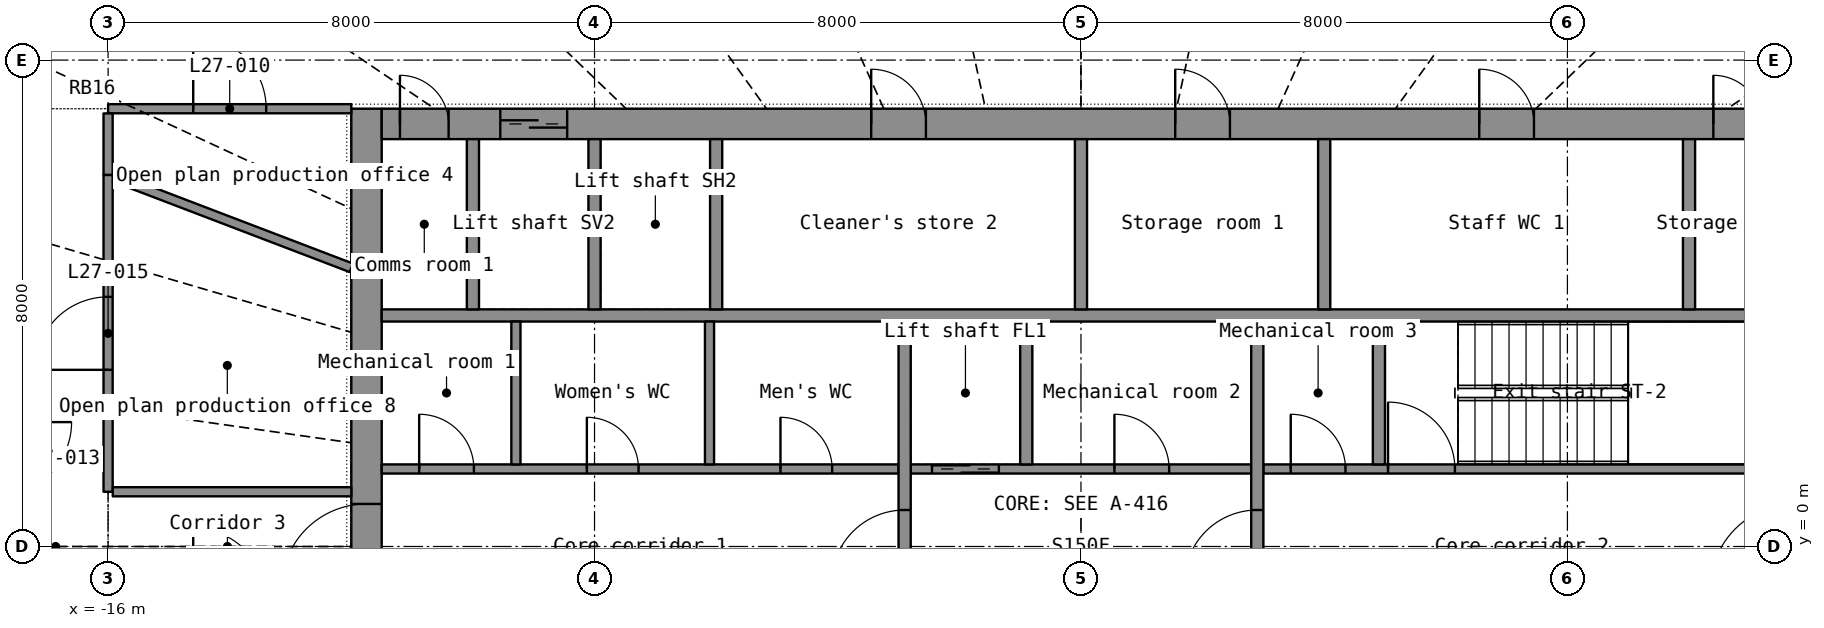
"""IFC4 building model, lengths in metres.
Left out: names, types, materials, properties, quantities, classifications, styles, units other than length and angle.
Written with IfcOpenShell. Run it as: python <this file> out.ifc"""

import sys

from ifc_helpers import new_model, si_unit, direction, frame, frame_2d, origin, place, context, subcontext, project, spatial, rectangle, extrude, element, fill, save


model = new_model("IFC4")
c1 = context("Model", 3, precision=1e-05, world=origin(), true_north=direction((0.0, 1.0)))
c2 = subcontext(c1, "Body", "Model", "MODEL_VIEW")
j1 = project(units=[si_unit("LENGTHUNIT", "METRE"), si_unit("PLANEANGLEUNIT", "RADIAN")], contexts=[c1])
p1 = place(None, origin())
s1 = spatial("IfcSite", under=j1, at=p1, CompositionType="ELEMENT")
p2 = place(p1, origin())
s2 = spatial("IfcBuilding", under=s1, at=p2, CompositionType="ELEMENT")
p3 = place(p2, frame((0.0, 0.0, 115.6)))
s3 = spatial("IfcBuildingStorey", under=s2, at=p3, CompositionType="ELEMENT", Elevation=115.6)
p4 = place(p3, frame((-11.75, -7.2, 0.0), z_axis=(0.0, 0.0, 1.0), x_axis=(0.0, 1.0, 0.0)))
e1 = element("IfcWall", 1, at=p4, inside=s3, PredefinedType="SHEAR", context=c2, shape_type="SweptSolid", body=[
    extrude(rectangle(XDim=14.4, YDim=0.5, at=frame_2d((7.2, 0.0))), origin(), (0.0, 0.0, 1.0), 3.3),
])
p5 = place(p4, frame((6.5, 0.0, 0.0)))
e2 = element("IfcOpeningElement", 2, at=p5, cuts=e1, PredefinedType="OPENING", context=c2, shape_type="SweptSolid", body=[
    extrude(rectangle(XDim=1.4, YDim=2.2, at=frame_2d((0.7, 1.1))), frame((0.0, 0.26, 0.0), z_axis=(0.0, -1.0, 0.0), x_axis=(1.0, 0.0, 0.0)), (0.0, 0.0, 1.0), 0.52),
])
p6 = place(p3, frame((-11.5, 6.95, 0.0), z_axis=(0.0, 0.0, 1.0), x_axis=(1.0, 0.0, 0.0)))
e3 = element("IfcWall", 3, at=p6, inside=s3, PredefinedType="SHEAR", context=c2, shape_type="SweptSolid", body=[
    extrude(rectangle(XDim=23.0, YDim=0.5, at=frame_2d((11.5, 0.0))), origin(), (0.0, 0.0, 1.0), 3.3),
])
p7 = place(p6, frame((1.95, 0.0, 0.0)))
e4 = element("IfcOpeningElement", 4, at=p7, cuts=e3, PredefinedType="OPENING", context=c2, shape_type="SweptSolid", body=[
    extrude(rectangle(XDim=1.1, YDim=2.2, at=frame_2d((0.55, 1.1))), frame((0.0, 0.26, 0.0), z_axis=(0.0, -1.0, 0.0), x_axis=(1.0, 0.0, 0.0)), (0.0, 0.0, 1.0), 0.52),
])
p8 = place(p6, frame((8.05, 0.0, 0.0)))
e5 = element("IfcOpeningElement", 5, at=p8, cuts=e3, PredefinedType="OPENING", context=c2, shape_type="SweptSolid", body=[
    extrude(rectangle(XDim=0.9, YDim=2.1, at=frame_2d((0.45, 1.05))), frame((0.0, 0.26, 0.0), z_axis=(0.0, -1.0, 0.0), x_axis=(1.0, 0.0, 0.0)), (0.0, 0.0, 1.0), 0.52),
])
p9 = place(p6, frame((13.05, 0.0, 0.0)))
e6 = element("IfcOpeningElement", 6, at=p9, cuts=e3, PredefinedType="OPENING", context=c2, shape_type="SweptSolid", body=[
    extrude(rectangle(XDim=0.9, YDim=2.1, at=frame_2d((0.45, 1.05))), frame((0.0, 0.26, 0.0), z_axis=(0.0, -1.0, 0.0), x_axis=(1.0, 0.0, 0.0)), (0.0, 0.0, 1.0), 0.52),
])
p10 = place(p6, frame((18.05, 0.0, 0.0)))
e7 = element("IfcOpeningElement", 7, at=p10, cuts=e3, PredefinedType="OPENING", context=c2, shape_type="SweptSolid", body=[
    extrude(rectangle(XDim=0.9, YDim=2.1, at=frame_2d((0.45, 1.05))), frame((0.0, 0.26, 0.0), z_axis=(0.0, -1.0, 0.0), x_axis=(1.0, 0.0, 0.0)), (0.0, 0.0, 1.0), 0.52),
])
p11 = place(p6, frame((0.3, 0.0, 0.0)))
e8 = element("IfcOpeningElement", 8, at=p11, cuts=e3, PredefinedType="OPENING", context=c2, shape_type="SweptSolid", body=[
    extrude(rectangle(XDim=0.8, YDim=2.05, at=frame_2d((0.4, 1.025))), frame((0.0, 0.26, 0.0), z_axis=(0.0, -1.0, 0.0), x_axis=(1.0, 0.0, 0.0)), (0.0, 0.0, 1.0), 0.52),
])
p12 = place(p6, frame((21.9, 0.0, 0.0)))
e9 = element("IfcOpeningElement", 9, at=p12, cuts=e3, PredefinedType="OPENING", context=c2, shape_type="SweptSolid", body=[
    extrude(rectangle(XDim=0.8, YDim=2.05, at=frame_2d((0.4, 1.025))), frame((0.0, 0.26, 0.0), z_axis=(0.0, -1.0, 0.0), x_axis=(1.0, 0.0, 0.0)), (0.0, 0.0, 1.0), 0.52),
])
p13 = place(p3, frame((-11.5, 3.8, 0.0), z_axis=(0.0, 0.0, 1.0), x_axis=(1.0, 0.0, 0.0)))
e10 = element("IfcWall", 10, at=p13, inside=s3, PredefinedType="SHEAR", context=c2, shape_type="SweptSolid", body=[
    extrude(rectangle(XDim=23.0, YDim=0.2, at=frame_2d((11.5, 0.0))), origin(), (0.0, 0.0, 1.0), 3.3),
])
for number, where, z_axis, x_axis in (
    (11, (-10.0, 3.9, 0.0), (0.0, 0.0, 1.0), (0.0, 1.0, 0.0)),
    (12, (-8.0, 3.9, 0.0), (0.0, 0.0, 1.0), (0.0, 1.0, 0.0)),
    (13, (-6.0, 3.9, 0.0), (0.0, 0.0, 1.0), (0.0, 1.0, 0.0)),
    (14, (10.0, 3.9, 0.0), (0.0, 0.0, 1.0), (0.0, 1.0, 0.0)),
):
    element("IfcWall", number, at=place(p3, frame(where, z_axis=z_axis, x_axis=x_axis)), inside=s3, PredefinedType="SHEAR", context=c2, shape_type="SweptSolid", body=[
        extrude(rectangle(XDim=2.8, YDim=0.2, at=frame_2d((1.4, 0.0))), origin(), (0.0, 0.0, 1.0), 3.3),
    ])
for number, where, z_axis, x_axis in (
    (15, (0.0, 3.9, 0.0), (0.0, 0.0, 1.0), (0.0, 1.0, 0.0)),
    (16, (4.0, 3.9, 0.0), (0.0, 0.0, 1.0), (0.0, 1.0, 0.0)),
):
    element("IfcWall", number, at=place(p3, frame(where, z_axis=z_axis, x_axis=x_axis)), inside=s3, PredefinedType="PARTITIONING", context=c2, shape_type="SweptSolid", body=[
        extrude(rectangle(XDim=2.8, YDim=0.2, at=frame_2d((1.4, 0.0))), origin(), (0.0, 0.0, 1.0), 3.3),
    ])
p14 = place(p3, frame((-11.5, 1.275, 0.0), z_axis=(0.0, 0.0, 1.0), x_axis=(1.0, 0.0, 0.0)))
e17 = element("IfcWall", 17, at=p14, inside=s3, PredefinedType="PARTITIONING", context=c2, shape_type="SweptSolid", body=[
    extrude(rectangle(XDim=8.5, YDim=0.15, at=frame_2d((4.25, 0.0))), origin(), (0.0, 0.0, 1.0), 3.3),
])
p15 = place(p14, frame((0.616, 0.0, 0.0)))
e18 = element("IfcOpeningElement", 18, at=p15, cuts=e17, PredefinedType="OPENING", context=c2, shape_type="SweptSolid", body=[
    extrude(rectangle(XDim=0.9, YDim=2.1, at=frame_2d((0.45, 1.05))), frame((0.0, 0.085, 0.0), z_axis=(0.0, -1.0, 0.0), x_axis=(1.0, 0.0, 0.0)), (0.0, 0.0, 1.0), 0.17),
])
p16 = place(p14, frame((3.374, 0.0, 0.0)))
e19 = element("IfcOpeningElement", 19, at=p16, cuts=e17, PredefinedType="OPENING", context=c2, shape_type="SweptSolid", body=[
    extrude(rectangle(XDim=0.85, YDim=2.1, at=frame_2d((0.425, 1.05))), frame((0.0, 0.085, 0.0), z_axis=(0.0, -1.0, 0.0), x_axis=(1.0, 0.0, 0.0)), (0.0, 0.0, 1.0), 0.17),
])
p17 = place(p14, frame((6.558, 0.0, 0.0)))
e20 = element("IfcOpeningElement", 20, at=p17, cuts=e17, PredefinedType="OPENING", context=c2, shape_type="SweptSolid", body=[
    extrude(rectangle(XDim=0.85, YDim=2.1, at=frame_2d((0.425, 1.05))), frame((0.0, 0.085, 0.0), z_axis=(0.0, -1.0, 0.0), x_axis=(1.0, 0.0, 0.0)), (0.0, 0.0, 1.0), 0.17),
])
p18 = place(p3, frame((-2.8, 1.275, 0.0), z_axis=(0.0, 0.0, 1.0), x_axis=(1.0, 0.0, 0.0)))
e21 = element("IfcWall", 21, at=p18, inside=s3, PredefinedType="SHEAR", context=c2, shape_type="SweptSolid", body=[
    extrude(rectangle(XDim=5.6, YDim=0.15, at=frame_2d((2.8, 0.0))), origin(), (0.0, 0.0, 1.0), 3.3),
])
p19 = place(p18, frame((0.35, 0.0, 0.0)))
e22 = element("IfcOpeningElement", 22, at=p19, cuts=e21, PredefinedType="OPENING", context=c2, shape_type="SweptSolid", body=[
    extrude(rectangle(XDim=1.1, YDim=2.2, at=frame_2d((0.55, 1.1))), frame((0.0, 0.085, 0.0), z_axis=(0.0, -1.0, 0.0), x_axis=(1.0, 0.0, 0.0)), (0.0, 0.0, 1.0), 0.17),
])
p20 = place(p18, frame((3.35, 0.0, 0.0)))
e23 = element("IfcOpeningElement", 23, at=p20, cuts=e21, PredefinedType="OPENING", context=c2, shape_type="SweptSolid", body=[
    extrude(rectangle(XDim=0.9, YDim=2.1, at=frame_2d((0.45, 1.05))), frame((0.0, 0.085, 0.0), z_axis=(0.0, -1.0, 0.0), x_axis=(1.0, 0.0, 0.0)), (0.0, 0.0, 1.0), 0.17),
])
p21 = place(p3, frame((3.0, 1.275, 0.0), z_axis=(0.0, 0.0, 1.0), x_axis=(1.0, 0.0, 0.0)))
e24 = element("IfcWall", 24, at=p21, inside=s3, PredefinedType="SHEAR", context=c2, shape_type="SweptSolid", body=[
    extrude(rectangle(XDim=8.5, YDim=0.15, at=frame_2d((4.25, 0.0))), origin(), (0.0, 0.0, 1.0), 3.3),
])
p22 = place(p21, frame((2.05, 0.0, 0.0)))
e25 = element("IfcOpeningElement", 25, at=p22, cuts=e24, PredefinedType="OPENING", context=c2, shape_type="SweptSolid", body=[
    extrude(rectangle(XDim=1.1, YDim=2.15, at=frame_2d((0.55, 1.075))), frame((0.0, 0.085, 0.0), z_axis=(0.0, -1.0, 0.0), x_axis=(1.0, 0.0, 0.0)), (0.0, 0.0, 1.0), 0.17),
])
p23 = place(p21, frame((0.45, 0.0, 0.0)))
e26 = element("IfcOpeningElement", 26, at=p23, cuts=e24, PredefinedType="OPENING", context=c2, shape_type="SweptSolid", body=[
    extrude(rectangle(XDim=0.9, YDim=2.1, at=frame_2d((0.45, 1.05))), frame((0.0, 0.085, 0.0), z_axis=(0.0, -1.0, 0.0), x_axis=(1.0, 0.0, 0.0)), (0.0, 0.0, 1.0), 0.17),
])
p24 = place(p3, frame((-2.9, -3.7, 0.0), z_axis=(0.0, 0.0, 1.0), x_axis=(0.0, 1.0, 0.0)))
e27 = element("IfcWall", 27, at=p24, inside=s3, PredefinedType="SHEAR", context=c2, shape_type="SweptSolid", body=[
    extrude(rectangle(XDim=7.4, YDim=0.2, at=frame_2d((3.7, 0.0))), origin(), (0.0, 0.0, 1.0), 3.3),
])
p25 = place(p24, frame((3.1, 0.0, 0.0)))
e28 = element("IfcOpeningElement", 28, at=p25, cuts=e27, PredefinedType="OPENING", context=c2, shape_type="SweptSolid", body=[
    extrude(rectangle(XDim=1.2, YDim=2.2, at=frame_2d((0.6, 1.1))), frame((0.0, 0.11, 0.0), z_axis=(0.0, -1.0, 0.0), x_axis=(1.0, 0.0, 0.0)), (0.0, 0.0, 1.0), 0.22),
])
p26 = place(p3, frame((2.9, -3.7, 0.0), z_axis=(0.0, 0.0, 1.0), x_axis=(0.0, 1.0, 0.0)))
e29 = element("IfcWall", 29, at=p26, inside=s3, PredefinedType="SHEAR", context=c2, shape_type="SweptSolid", body=[
    extrude(rectangle(XDim=7.4, YDim=0.2, at=frame_2d((3.7, 0.0))), origin(), (0.0, 0.0, 1.0), 3.3),
])
p27 = place(p26, frame((3.1, 0.0, 0.0)))
e30 = element("IfcOpeningElement", 30, at=p27, cuts=e29, PredefinedType="OPENING", context=c2, shape_type="SweptSolid", body=[
    extrude(rectangle(XDim=1.2, YDim=2.2, at=frame_2d((0.6, 1.1))), frame((0.0, 0.11, 0.0), z_axis=(0.0, -1.0, 0.0), x_axis=(1.0, 0.0, 0.0)), (0.0, 0.0, 1.0), 0.22),
])
for number, where, z_axis, x_axis in (
    (31, (-0.9, 1.35, 0.0), (0.0, 0.0, 1.0), (0.0, 1.0, 0.0)),
    (32, (4.9, 1.35, 0.0), (0.0, 0.0, 1.0), (0.0, 1.0, 0.0)),
):
    element("IfcWall", number, at=place(p3, frame(where, z_axis=z_axis, x_axis=x_axis)), inside=s3, PredefinedType="SHEAR", context=c2, shape_type="SweptSolid", body=[
        extrude(rectangle(XDim=2.35, YDim=0.2, at=frame_2d((1.175, 0.0))), origin(), (0.0, 0.0, 1.0), 3.3),
    ])
for number, where, z_axis, x_axis in (
    (33, (-9.293, 1.35, 0.0), (0.0, 0.0, 1.0), (0.0, 1.0, 0.0)),
    (34, (-6.109, 1.35, 0.0), (0.0, 0.0, 1.0), (0.0, 1.0, 0.0)),
):
    element("IfcWall", number, at=place(p3, frame(where, z_axis=z_axis, x_axis=x_axis)), inside=s3, PredefinedType="PARTITIONING", context=c2, shape_type="SweptSolid", body=[
        extrude(rectangle(XDim=2.35, YDim=0.15, at=frame_2d((1.175, 0.0))), origin(), (0.0, 0.0, 1.0), 3.3),
    ])
p28 = place(p3, frame((-16.0, 0.9, 0.0), z_axis=(0.0, 0.0, 1.0), x_axis=(0.0, 1.0, 0.0)))
e35 = element("IfcWall", 35, at=p28, inside=s3, PredefinedType="PARTITIONING", context=c2, shape_type="SweptSolid", body=[
    extrude(rectangle(XDim=5.211, YDim=0.15, at=frame_2d((2.606, 0.0))), origin(), (0.0, 0.0, 1.0), 2.4),
])
p29 = place(p28, frame((2.006, 0.0, 0.0)))
e36 = element("IfcOpeningElement", 36, at=p29, cuts=e35, PredefinedType="OPENING", context=c2, shape_type="SweptSolid", body=[
    extrude(rectangle(XDim=1.2, YDim=2.2, at=frame_2d((0.6, 1.1))), frame((0.0, 0.085, 0.0), z_axis=(0.0, -1.0, 0.0), x_axis=(1.0, 0.0, 0.0)), (0.0, 0.0, 1.0), 0.17),
])
p30 = place(p3, frame((-15.896, 6.072, 0.0), z_axis=(0.0, 0.0, 1.0), x_axis=(0.934175823, -0.356813021, 0.0)))
e37 = element("IfcWall", 37, at=p30, inside=s3, PredefinedType="PARTITIONING", context=c2, shape_type="SweptSolid", body=[
    extrude(rectangle(XDim=4.171, YDim=0.15, at=frame_2d((2.085, 0.0))), origin(), (0.0, 0.0, 1.0), 2.4),
])
p31 = place(p3, frame((-16.0, 7.2, 0.0), z_axis=(0.0, 0.0, 1.0), x_axis=(1.0, 0.0, 0.0)))
e38 = element("IfcWall", 38, at=p31, inside=s3, PredefinedType="PARTITIONING", context=c2, shape_type="SweptSolid", body=[
    extrude(rectangle(XDim=4.0, YDim=0.15, at=frame_2d((2.0, 0.0))), origin(), (0.0, 0.0, 1.0), 2.4),
])
p32 = place(p31, frame((1.4, 0.0, 0.0)))
e39 = element("IfcOpeningElement", 39, at=p32, cuts=e38, PredefinedType="OPENING", context=c2, shape_type="SweptSolid", body=[
    extrude(rectangle(XDim=1.2, YDim=2.2, at=frame_2d((0.6, 1.1))), frame((0.0, 0.085, 0.0), z_axis=(0.0, -1.0, 0.0), x_axis=(1.0, 0.0, 0.0)), (0.0, 0.0, 1.0), 0.17),
])
p33 = place(p3, frame((-12.0, 0.9, 0.0), z_axis=(0.0, 0.0, 1.0), x_axis=(-1.0, 0.0, 0.0)))
e40 = element("IfcWall", 40, at=p33, inside=s3, PredefinedType="PARTITIONING", context=c2, shape_type="SweptSolid", body=[
    extrude(rectangle(XDim=3.923, YDim=0.15, at=frame_2d((1.961, 0.0))), origin(), (0.0, 0.0, 1.0), 2.4),
])
p34 = place(p3, frame((-16.0, 6.112, 0.0), z_axis=(0.0, 0.0, 1.0), x_axis=(0.0, 1.0, 0.0)))
e41 = element("IfcWall", 41, at=p34, inside=s3, PredefinedType="PARTITIONING", context=c2, shape_type="SweptSolid", body=[
    extrude(rectangle(XDim=1.011, YDim=0.15, at=frame_2d((0.505, 0.0))), origin(), (0.0, 0.0, 1.0), 2.4),
])
p35 = place(p7, origin())
e42 = element("IfcDoor", 42, at=p35, inside=s3, OperationType="DOUBLE_DOOR_SLIDING", PredefinedType="DOOR", context=c2, shape_type="SweptSolid", body=[
    extrude(rectangle(XDim=1.1, YDim=2.2, at=frame_2d((0.55, 1.1))), frame((0.0, 0.025, 0.0), z_axis=(0.0, -1.0, 0.0), x_axis=(1.0, 0.0, 0.0)), (0.0, 0.0, 1.0), 0.05),
])
fill(e4, e42)
p36 = place(p8, origin())
e43 = element("IfcDoor", 43, at=p36, inside=s3, OperationType="SINGLE_SWING_LEFT", PredefinedType="DOOR", context=c2, shape_type="SweptSolid", body=[
    extrude(rectangle(XDim=0.9, YDim=2.1, at=frame_2d((0.45, 1.05))), frame((0.0, 0.025, 0.0), z_axis=(0.0, -1.0, 0.0), x_axis=(1.0, 0.0, 0.0)), (0.0, 0.0, 1.0), 0.05),
])
fill(e5, e43)
p37 = place(p9, origin())
e44 = element("IfcDoor", 44, at=p37, inside=s3, OperationType="SINGLE_SWING_LEFT", PredefinedType="DOOR", context=c2, shape_type="SweptSolid", body=[
    extrude(rectangle(XDim=0.9, YDim=2.1, at=frame_2d((0.45, 1.05))), frame((0.0, 0.025, 0.0), z_axis=(0.0, -1.0, 0.0), x_axis=(1.0, 0.0, 0.0)), (0.0, 0.0, 1.0), 0.05),
])
fill(e6, e44)
p38 = place(p10, origin())
e45 = element("IfcDoor", 45, at=p38, inside=s3, OperationType="SINGLE_SWING_LEFT", PredefinedType="DOOR", context=c2, shape_type="SweptSolid", body=[
    extrude(rectangle(XDim=0.9, YDim=2.1, at=frame_2d((0.45, 1.05))), frame((0.0, 0.025, 0.0), z_axis=(0.0, -1.0, 0.0), x_axis=(1.0, 0.0, 0.0)), (0.0, 0.0, 1.0), 0.05),
])
fill(e7, e45)
p39 = place(p11, origin())
e46 = element("IfcDoor", 46, at=p39, inside=s3, OperationType="SINGLE_SWING_LEFT", PredefinedType="DOOR", context=c2, shape_type="SweptSolid", body=[
    extrude(rectangle(XDim=0.8, YDim=2.05, at=frame_2d((0.4, 1.025))), frame((0.0, 0.025, 0.0), z_axis=(0.0, -1.0, 0.0), x_axis=(1.0, 0.0, 0.0)), (0.0, 0.0, 1.0), 0.05),
])
fill(e8, e46)
p40 = place(p12, origin())
e47 = element("IfcDoor", 47, at=p40, inside=s3, OperationType="SINGLE_SWING_LEFT", PredefinedType="DOOR", context=c2, shape_type="SweptSolid", body=[
    extrude(rectangle(XDim=0.8, YDim=2.05, at=frame_2d((0.4, 1.025))), frame((0.0, 0.025, 0.0), z_axis=(0.0, -1.0, 0.0), x_axis=(1.0, 0.0, 0.0)), (0.0, 0.0, 1.0), 0.05),
])
fill(e9, e47)
p41 = place(p5, origin())
e48 = element("IfcDoor", 48, at=p41, inside=s3, OperationType="DOUBLE_DOOR_SINGLE_SWING", PredefinedType="DOOR", context=c2, shape_type="SweptSolid", body=[
    extrude(rectangle(XDim=1.4, YDim=2.2, at=frame_2d((0.7, 1.1))), frame((0.0, 0.025, 0.0), z_axis=(0.0, -1.0, 0.0), x_axis=(1.0, 0.0, 0.0)), (0.0, 0.0, 1.0), 0.05),
])
fill(e2, e48)
p42 = place(p25, origin())
e49 = element("IfcDoor", 49, at=p42, inside=s3, OperationType="SINGLE_SWING_LEFT", PredefinedType="DOOR", context=c2, shape_type="SweptSolid", body=[
    extrude(rectangle(XDim=1.2, YDim=2.2, at=frame_2d((0.6, 1.1))), frame((0.0, 0.025, 0.0), z_axis=(0.0, -1.0, 0.0), x_axis=(1.0, 0.0, 0.0)), (0.0, 0.0, 1.0), 0.05),
])
fill(e28, e49)
p43 = place(p27, origin())
e50 = element("IfcDoor", 50, at=p43, inside=s3, OperationType="SINGLE_SWING_LEFT", PredefinedType="DOOR", context=c2, shape_type="SweptSolid", body=[
    extrude(rectangle(XDim=1.2, YDim=2.2, at=frame_2d((0.6, 1.1))), frame((0.0, 0.025, 0.0), z_axis=(0.0, -1.0, 0.0), x_axis=(1.0, 0.0, 0.0)), (0.0, 0.0, 1.0), 0.05),
])
fill(e30, e50)
p44 = place(p19, origin())
e51 = element("IfcDoor", 51, at=p44, inside=s3, OperationType="DOUBLE_DOOR_SLIDING", PredefinedType="DOOR", context=c2, shape_type="SweptSolid", body=[
    extrude(rectangle(XDim=1.1, YDim=2.2, at=frame_2d((0.55, 1.1))), frame((0.0, 0.025, 0.0), z_axis=(0.0, -1.0, 0.0), x_axis=(1.0, 0.0, 0.0)), (0.0, 0.0, 1.0), 0.05),
])
fill(e22, e51)
p45 = place(p22, origin())
e52 = element("IfcDoor", 52, at=p45, inside=s3, OperationType="SINGLE_SWING_LEFT", PredefinedType="DOOR", context=c2, shape_type="SweptSolid", body=[
    extrude(rectangle(XDim=1.1, YDim=2.15, at=frame_2d((0.55, 1.075))), frame((0.0, 0.025, 0.0), z_axis=(0.0, -1.0, 0.0), x_axis=(1.0, 0.0, 0.0)), (0.0, 0.0, 1.0), 0.05),
])
fill(e25, e52)
p46 = place(p15, origin())
e53 = element("IfcDoor", 53, at=p46, inside=s3, OperationType="SINGLE_SWING_LEFT", PredefinedType="DOOR", context=c2, shape_type="SweptSolid", body=[
    extrude(rectangle(XDim=0.9, YDim=2.1, at=frame_2d((0.45, 1.05))), frame((0.0, 0.025, 0.0), z_axis=(0.0, -1.0, 0.0), x_axis=(1.0, 0.0, 0.0)), (0.0, 0.0, 1.0), 0.05),
])
fill(e18, e53)
p47 = place(p16, origin())
e54 = element("IfcDoor", 54, at=p47, inside=s3, OperationType="SINGLE_SWING_LEFT", PredefinedType="DOOR", context=c2, shape_type="SweptSolid", body=[
    extrude(rectangle(XDim=0.85, YDim=2.1, at=frame_2d((0.425, 1.05))), frame((0.0, 0.025, 0.0), z_axis=(0.0, -1.0, 0.0), x_axis=(1.0, 0.0, 0.0)), (0.0, 0.0, 1.0), 0.05),
])
fill(e19, e54)
p48 = place(p17, origin())
e55 = element("IfcDoor", 55, at=p48, inside=s3, OperationType="SINGLE_SWING_LEFT", PredefinedType="DOOR", context=c2, shape_type="SweptSolid", body=[
    extrude(rectangle(XDim=0.85, YDim=2.1, at=frame_2d((0.425, 1.05))), frame((0.0, 0.025, 0.0), z_axis=(0.0, -1.0, 0.0), x_axis=(1.0, 0.0, 0.0)), (0.0, 0.0, 1.0), 0.05),
])
fill(e20, e55)
p49 = place(p20, origin())
e56 = element("IfcDoor", 56, at=p49, inside=s3, OperationType="SINGLE_SWING_LEFT", PredefinedType="DOOR", context=c2, shape_type="SweptSolid", body=[
    extrude(rectangle(XDim=0.9, YDim=2.1, at=frame_2d((0.45, 1.05))), frame((0.0, 0.025, 0.0), z_axis=(0.0, -1.0, 0.0), x_axis=(1.0, 0.0, 0.0)), (0.0, 0.0, 1.0), 0.05),
])
fill(e23, e56)
p50 = place(p23, origin())
e57 = element("IfcDoor", 57, at=p50, inside=s3, OperationType="SINGLE_SWING_LEFT", PredefinedType="DOOR", context=c2, shape_type="SweptSolid", body=[
    extrude(rectangle(XDim=0.9, YDim=2.1, at=frame_2d((0.45, 1.05))), frame((0.0, 0.025, 0.0), z_axis=(0.0, -1.0, 0.0), x_axis=(1.0, 0.0, 0.0)), (0.0, 0.0, 1.0), 0.05),
])
fill(e26, e57)
p51 = place(p32, origin())
e58 = element("IfcDoor", 58, at=p51, inside=s3, OperationType="DOUBLE_DOOR_SINGLE_SWING", PredefinedType="DOOR", context=c2, shape_type="SweptSolid", body=[
    extrude(rectangle(XDim=1.2, YDim=2.2, at=frame_2d((0.6, 1.1))), frame((0.0, 0.025, 0.0), z_axis=(0.0, -1.0, 0.0), x_axis=(1.0, 0.0, 0.0)), (0.0, 0.0, 1.0), 0.05),
])
fill(e39, e58)
p52 = place(p29, origin())
e59 = element("IfcDoor", 59, at=p52, inside=s3, OperationType="DOUBLE_DOOR_SINGLE_SWING", PredefinedType="DOOR", context=c2, shape_type="SweptSolid", body=[
    extrude(rectangle(XDim=1.2, YDim=2.2, at=frame_2d((0.6, 1.1))), frame((0.0, 0.025, 0.0), z_axis=(0.0, -1.0, 0.0), x_axis=(1.0, 0.0, 0.0)), (0.0, 0.0, 1.0), 0.05),
])
fill(e36, e59)
save(model, sys.argv[1])
